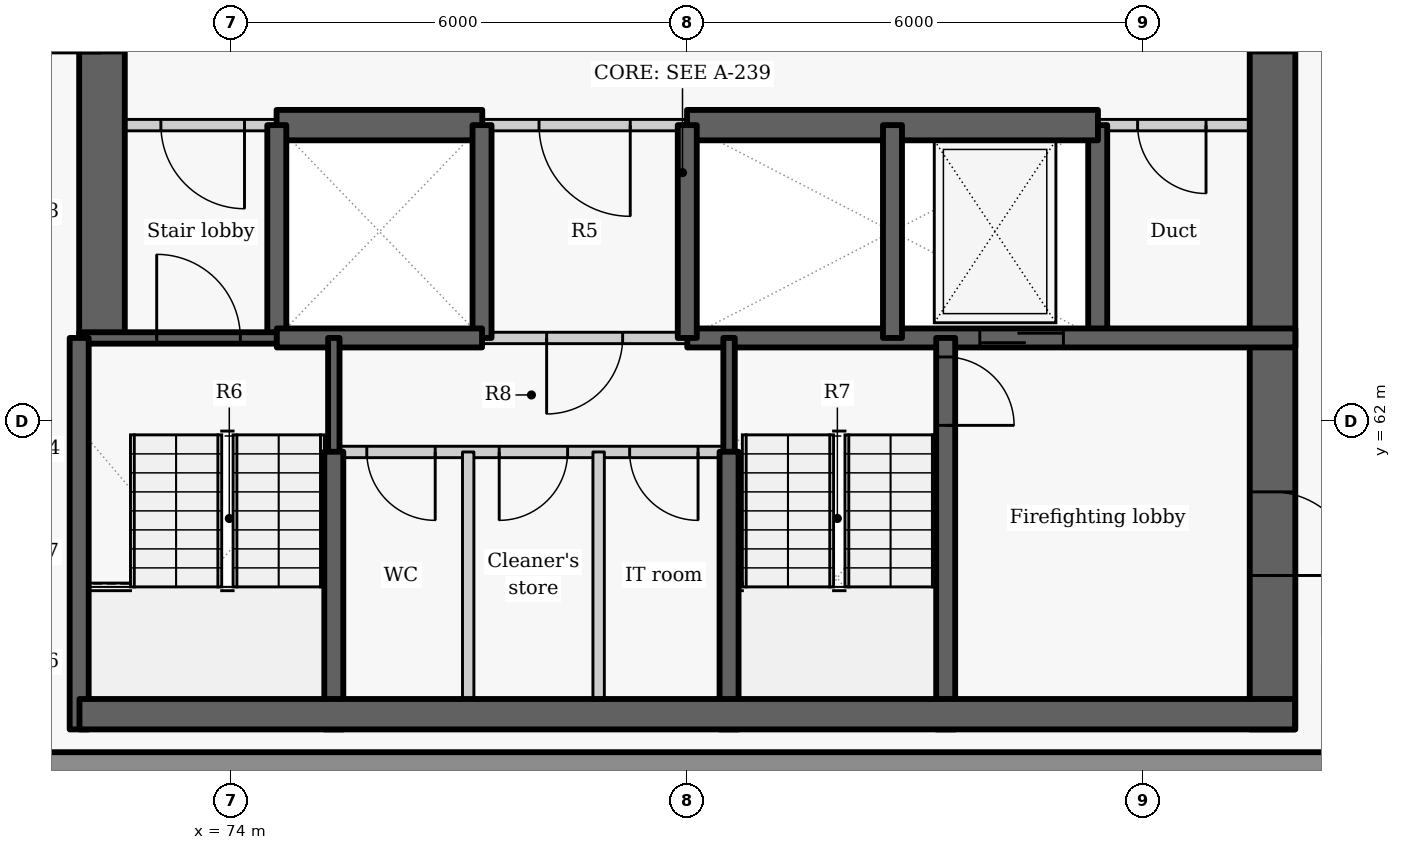
"""IFC4 building model, lengths in metres.
Left out: names, types, materials, properties, quantities, classifications, styles, units other than length and angle.
Written with IfcOpenShell. Run it as: python <this file> out.ifc"""

import sys

from ifc_helpers import new_model, si_unit, direction, frame, frame_2d, origin, place, context, subcontext, project, spatial, rectangle, extrude, element, fill, save


model = new_model("IFC4")
c1 = context("Model", 3, precision=1e-05, world=origin(), true_north=direction((0.0, 1.0)))
c2 = subcontext(c1, "Body", "Model", "MODEL_VIEW")
j1 = project(units=[si_unit("LENGTHUNIT", "METRE"), si_unit("PLANEANGLEUNIT", "RADIAN")], contexts=[c1])
p1 = place(None, origin())
s1 = spatial("IfcSite", under=j1, at=p1, CompositionType="ELEMENT")
p2 = place(p1, origin())
s2 = spatial("IfcBuilding", under=s1, at=p2, CompositionType="ELEMENT")
p3 = place(p2, frame((0.0, 0.0, 226.2)))
s3 = spatial("IfcBuildingStorey", under=s2, at=p3, CompositionType="ELEMENT", Elevation=226.2)
p4 = place(p3, frame((70.501, 57.5, 0.0), z_axis=(0.0, 0.0, 1.0), x_axis=(1.0, 0.0, 0.0)))
e1 = element("IfcWall", 1, at=p4, inside=s3, PredefinedType="SOLIDWALL", context=c2, shape_type="SweptSolid", body=[
    extrude(rectangle(XDim=18.993, YDim=0.3, at=frame_2d((9.496, 0.0))), origin(), (0.0, 0.0, 1.0), 2.425),
])
p5 = place(p3, frame((72.3, 63.1, -0.41), z_axis=(0.0, 0.0, 1.0), x_axis=(0.0, 1.0, 0.0)))
e2 = element("IfcWall", 2, at=p5, inside=s3, PredefinedType="SHEAR", context=c2, shape_type="SweptSolid", body=[
    extrude(rectangle(XDim=9.1, YDim=0.6, at=frame_2d((4.55, 0.0))), origin(), (0.0, 0.0, 1.0), 3.435),
])
p6 = place(p5, frame((3.75, 0.0, 0.41)))
e3 = element("IfcOpeningElement", 3, at=p6, cuts=e2, PredefinedType="OPENING", context=c2, shape_type="SweptSolid", body=[
    extrude(rectangle(XDim=1.5, YDim=2.1, at=frame_2d((0.75, 1.05))), frame((0.0, 0.31, 0.0), z_axis=(0.0, -1.0, 0.0), x_axis=(1.0, 0.0, 0.0)), (0.0, 0.0, 1.0), 0.62),
])
p7 = place(p3, frame((85.4, 63.1, -0.41), z_axis=(0.0, 0.0, 1.0), x_axis=(0.0, 1.0, 0.0)))
e4 = element("IfcWall", 4, at=p7, inside=s3, PredefinedType="SHEAR", context=c2, shape_type="SweptSolid", body=[
    extrude(rectangle(XDim=2.8, YDim=0.25, at=frame_2d((1.4, 0.0))), origin(), (0.0, 0.0, 1.0), 3.435),
])
p8 = place(p3, frame((87.7, 72.2, -0.41), z_axis=(0.0, 0.0, 1.0), x_axis=(0.0, -1.0, 0.0)))
e5 = element("IfcWall", 5, at=p8, inside=s3, PredefinedType="SHEAR", context=c2, shape_type="SweptSolid", body=[
    extrude(rectangle(XDim=14.25, YDim=0.6, at=frame_2d((7.125, 0.0))), origin(), (0.0, 0.0, 1.0), 3.435),
])
p9 = place(p8, frame((3.85, 0.0, 0.41)))
e6 = element("IfcOpeningElement", 6, at=p9, cuts=e5, PredefinedType="OPENING", context=c2, shape_type="SweptSolid", body=[
    extrude(rectangle(XDim=1.5, YDim=2.1, at=frame_2d((0.75, 1.05))), frame((0.0, 0.31, 0.0), z_axis=(0.0, -1.0, 0.0), x_axis=(1.0, 0.0, 0.0)), (0.0, 0.0, 1.0), 0.62),
])
p10 = place(p8, frame((11.125, 0.0, 0.41)))
e7 = element("IfcOpeningElement", 7, at=p10, cuts=e5, PredefinedType="OPENING", context=c2, shape_type="SweptSolid", body=[
    extrude(rectangle(XDim=1.1, YDim=2.1, at=frame_2d((0.55, 1.05))), frame((0.0, 0.31, 0.0), z_axis=(0.0, -1.0, 0.0), x_axis=(1.0, 0.0, 0.0)), (0.0, 0.0, 1.0), 0.62),
])
p11 = place(p3, frame((74.603, 65.9, 0.0), z_axis=(0.0, 0.0, 1.0), x_axis=(-1.0, 0.0, 0.0)))
e8 = element("IfcWall", 8, at=p11, inside=s3, PredefinedType="PARTITIONING", context=c2, shape_type="SweptSolid", body=[
    extrude(rectangle(XDim=2.603, YDim=0.15, at=frame_2d((1.302, 0.0))), origin(), (0.0, 0.0, 1.0), 3.025),
])
p12 = place(p11, frame((0.428, 0.0, 0.0)))
e9 = element("IfcOpeningElement", 9, at=p12, cuts=e8, PredefinedType="OPENING", context=c2, shape_type="SweptSolid", body=[
    extrude(rectangle(XDim=1.1, YDim=2.1, at=frame_2d((0.55, 1.05))), frame((0.0, 0.085, 0.0), z_axis=(0.0, -1.0, 0.0), x_axis=(1.0, 0.0, 0.0)), (0.0, 0.0, 1.0), 0.17),
])
p13 = place(p3, frame((80.003, 65.9, 0.0), z_axis=(0.0, 0.0, 1.0), x_axis=(-1.0, 0.0, 0.0)))
e10 = element("IfcWall", 10, at=p13, inside=s3, PredefinedType="PARTITIONING", context=c2, shape_type="SweptSolid", body=[
    extrude(rectangle(XDim=2.706, YDim=0.15, at=frame_2d((1.353, 0.0))), origin(), (0.0, 0.0, 1.0), 3.025),
])
p14 = place(p13, frame((0.753, 0.0, 0.0)))
e11 = element("IfcOpeningElement", 11, at=p14, cuts=e10, PredefinedType="OPENING", context=c2, shape_type="SweptSolid", body=[
    extrude(rectangle(XDim=1.2, YDim=2.1, at=frame_2d((0.6, 1.05))), frame((0.0, 0.085, 0.0), z_axis=(0.0, -1.0, 0.0), x_axis=(1.0, 0.0, 0.0)), (0.0, 0.0, 1.0), 0.17),
])
p15 = place(p3, frame((88.0, 65.9, 0.0), z_axis=(0.0, 0.0, 1.0), x_axis=(-1.0, 0.0, 0.0)))
e12 = element("IfcWall", 12, at=p15, inside=s3, PredefinedType="PARTITIONING", context=c2, shape_type="SweptSolid", body=[
    extrude(rectangle(XDim=2.603, YDim=0.15, at=frame_2d((1.302, 0.0))), origin(), (0.0, 0.0, 1.0), 3.025),
])
p16 = place(p15, frame((1.175, 0.0, 0.0)))
e13 = element("IfcOpeningElement", 13, at=p16, cuts=e12, PredefinedType="OPENING", context=c2, shape_type="SweptSolid", body=[
    extrude(rectangle(XDim=0.9, YDim=2.1, at=frame_2d((0.45, 1.05))), frame((0.0, 0.085, 0.0), z_axis=(0.0, -1.0, 0.0), x_axis=(1.0, 0.0, 0.0)), (0.0, 0.0, 1.0), 0.17),
])
p17 = place(p3, frame((74.597, 65.9, -0.41), z_axis=(0.0, 0.0, 1.0), x_axis=(1.0, 0.0, 0.0)))
e14 = element("IfcWall", 14, at=p17, inside=s3, PredefinedType="SHEAR", context=c2, shape_type="SweptSolid", body=[
    extrude(rectangle(XDim=2.706, YDim=0.4, at=frame_2d((1.353, 0.0))), origin(), (0.0, 0.0, 1.0), 3.435),
])
p18 = place(p3, frame((79.997, 65.9, -0.41), z_axis=(0.0, 0.0, 1.0), x_axis=(1.0, 0.0, 0.0)))
e15 = element("IfcWall", 15, at=p18, inside=s3, PredefinedType="SHEAR", context=c2, shape_type="SweptSolid", body=[
    extrude(rectangle(XDim=5.406, YDim=0.4, at=frame_2d((2.703, 0.0))), origin(), (0.0, 0.0, 1.0), 3.435),
])
p19 = place(p3, frame((74.6, 63.1, -0.41), z_axis=(0.0, 0.0, 1.0), x_axis=(0.0, 1.0, 0.0)))
e16 = element("IfcWall", 16, at=p19, inside=s3, PredefinedType="SHEAR", context=c2, shape_type="SweptSolid", body=[
    extrude(rectangle(XDim=2.8, YDim=0.25, at=frame_2d((1.4, 0.0))), origin(), (0.0, 0.0, 1.0), 3.435),
])
p20 = place(p3, frame((72.0, 63.1, -0.41), z_axis=(0.0, 0.0, 1.0), x_axis=(1.0, 0.0, 0.0)))
e17 = element("IfcWall", 17, at=p20, inside=s3, PredefinedType="SHEAR", context=c2, shape_type="SweptSolid", body=[
    extrude(rectangle(XDim=2.6, YDim=0.15, at=frame_2d((1.3, 0.0))), origin(), (0.0, 0.0, 1.0), 3.435),
])
p21 = place(p20, frame((1.02, 0.0, 0.41)))
e18 = element("IfcOpeningElement", 18, at=p21, cuts=e17, PredefinedType="OPENING", context=c2, shape_type="SweptSolid", body=[
    extrude(rectangle(XDim=1.1, YDim=2.1, at=frame_2d((0.55, 1.05))), frame((0.0, 0.085, 0.0), z_axis=(0.0, -1.0, 0.0), x_axis=(1.0, 0.0, 0.0)), (0.0, 0.0, 1.0), 0.17),
])
p22 = place(p3, frame((77.3, 63.1, -0.41), z_axis=(0.0, 0.0, 1.0), x_axis=(0.0, 1.0, 0.0)))
e19 = element("IfcWall", 19, at=p22, inside=s3, PredefinedType="SHEAR", context=c2, shape_type="SweptSolid", body=[
    extrude(rectangle(XDim=2.8, YDim=0.25, at=frame_2d((1.4, 0.0))), origin(), (0.0, 0.0, 1.0), 3.435),
])
p23 = place(p3, frame((74.6, 63.1, -0.41), z_axis=(0.0, 0.0, 1.0), x_axis=(1.0, 0.0, 0.0)))
e20 = element("IfcWall", 20, at=p23, inside=s3, PredefinedType="SHEAR", context=c2, shape_type="SweptSolid", body=[
    extrude(rectangle(XDim=2.7, YDim=0.25, at=frame_2d((1.35, 0.0))), origin(), (0.0, 0.0, 1.0), 3.435),
])
p24 = place(p3, frame((80.0, 63.1, -0.41), z_axis=(0.0, 0.0, 1.0), x_axis=(1.0, 0.0, 0.0)))
e21 = element("IfcWall", 21, at=p24, inside=s3, PredefinedType="SHEAR", context=c2, shape_type="SweptSolid", body=[
    extrude(rectangle(XDim=8.0, YDim=0.25, at=frame_2d((4.0, 0.0))), origin(), (0.0, 0.0, 1.0), 3.435),
])
p25 = place(p24, frame((3.849, 0.0, 0.41)))
e22 = element("IfcOpeningElement", 22, at=p25, cuts=e21, PredefinedType="OPENING", context=c2, shape_type="SweptSolid", body=[
    extrude(rectangle(XDim=1.1, YDim=2.1, at=frame_2d((0.55, 1.05))), frame((0.0, 0.135, 0.0), z_axis=(0.0, -1.0, 0.0), x_axis=(1.0, 0.0, 0.0)), (0.0, 0.0, 1.0), 0.27),
])
p26 = place(p3, frame((80.0, 63.1, -0.41), z_axis=(0.0, 0.0, 1.0), x_axis=(0.0, 1.0, 0.0)))
e23 = element("IfcWall", 23, at=p26, inside=s3, PredefinedType="SHEAR", context=c2, shape_type="SweptSolid", body=[
    extrude(rectangle(XDim=2.8, YDim=0.25, at=frame_2d((1.4, 0.0))), origin(), (0.0, 0.0, 1.0), 3.435),
])
p27 = place(p3, frame((80.0, 63.1, 0.0), z_axis=(0.0, 0.0, 1.0), x_axis=(-1.0, 0.0, 0.0)))
e24 = element("IfcWall", 24, at=p27, inside=s3, PredefinedType="PARTITIONING", context=c2, shape_type="SweptSolid", body=[
    extrude(rectangle(XDim=2.7, YDim=0.15, at=frame_2d((1.35, 0.0))), origin(), (0.0, 0.0, 1.0), 3.025),
])
p28 = place(p27, frame((0.85, 0.0, 0.0)))
e25 = element("IfcOpeningElement", 25, at=p28, cuts=e24, PredefinedType="OPENING", context=c2, shape_type="SweptSolid", body=[
    extrude(rectangle(XDim=1.0, YDim=2.1, at=frame_2d((0.5, 1.05))), frame((0.0, 0.085, 0.0), z_axis=(0.0, -1.0, 0.0), x_axis=(1.0, 0.0, 0.0)), (0.0, 0.0, 1.0), 0.17),
])
p29 = place(p3, frame((82.7, 63.1, -0.41), z_axis=(0.0, 0.0, 1.0), x_axis=(0.0, 1.0, 0.0)))
e26 = element("IfcWall", 26, at=p29, inside=s3, PredefinedType="SHEAR", context=c2, shape_type="SweptSolid", body=[
    extrude(rectangle(XDim=2.8, YDim=0.25, at=frame_2d((1.4, 0.0))), origin(), (0.0, 0.0, 1.0), 3.435),
])
p30 = place(p3, frame((75.35, 61.597, -0.41), z_axis=(0.0, 0.0, 1.0), x_axis=(0.0, 1.0, 0.0)))
e27 = element("IfcWall", 27, at=p30, inside=s3, PredefinedType="SHEAR", context=c2, shape_type="SweptSolid", body=[
    extrude(rectangle(XDim=1.503, YDim=0.15, at=frame_2d((0.751, 0.0))), origin(), (0.0, 0.0, 1.0), 3.435),
])
p31 = place(p3, frame((75.35, 57.95, -0.41), z_axis=(0.0, 0.0, 1.0), x_axis=(0.0, 1.0, 0.0)))
e28 = element("IfcWall", 28, at=p31, inside=s3, PredefinedType="SHEAR", context=c2, shape_type="SweptSolid", body=[
    extrude(rectangle(XDim=3.653, YDim=0.25, at=frame_2d((1.827, 0.0))), origin(), (0.0, 0.0, 1.0), 3.435),
])
p32 = place(p3, frame((72.0, 57.95, -0.41), z_axis=(0.0, 0.0, 1.0), x_axis=(0.0, 1.0, 0.0)))
e29 = element("IfcWall", 29, at=p32, inside=s3, PredefinedType="SHEAR", context=c2, shape_type="SweptSolid", body=[
    extrude(rectangle(XDim=5.15, YDim=0.25, at=frame_2d((2.575, 0.0))), origin(), (0.0, 0.0, 1.0), 3.435),
])
p33 = place(p3, frame((83.4, 63.1, -0.41), z_axis=(0.0, 0.0, 1.0), x_axis=(0.0, -1.0, 0.0)))
e30 = element("IfcWall", 30, at=p33, inside=s3, PredefinedType="SHEAR", context=c2, shape_type="SweptSolid", body=[
    extrude(rectangle(XDim=5.15, YDim=0.25, at=frame_2d((2.575, 0.0))), origin(), (0.0, 0.0, 1.0), 3.435),
])
p34 = place(p33, frame((0.25, 0.0, 0.41)))
e31 = element("IfcOpeningElement", 31, at=p34, cuts=e30, PredefinedType="OPENING", context=c2, shape_type="SweptSolid", body=[
    extrude(rectangle(XDim=0.9, YDim=2.1, at=frame_2d((0.45, 1.05))), frame((0.0, 0.135, 0.0), z_axis=(0.0, -1.0, 0.0), x_axis=(1.0, 0.0, 0.0)), (0.0, 0.0, 1.0), 0.27),
])
p35 = place(p3, frame((80.55, 61.597, -0.41), z_axis=(0.0, 0.0, 1.0), x_axis=(0.0, 1.0, 0.0)))
e32 = element("IfcWall", 32, at=p35, inside=s3, PredefinedType="SHEAR", context=c2, shape_type="SweptSolid", body=[
    extrude(rectangle(XDim=1.503, YDim=0.15, at=frame_2d((0.751, 0.0))), origin(), (0.0, 0.0, 1.0), 3.435),
])
p36 = place(p3, frame((80.55, 57.95, -0.41), z_axis=(0.0, 0.0, 1.0), x_axis=(0.0, 1.0, 0.0)))
e33 = element("IfcWall", 33, at=p36, inside=s3, PredefinedType="SHEAR", context=c2, shape_type="SweptSolid", body=[
    extrude(rectangle(XDim=3.653, YDim=0.25, at=frame_2d((1.827, 0.0))), origin(), (0.0, 0.0, 1.0), 3.435),
])
p37 = place(p3, frame((80.55, 61.6, 0.0), z_axis=(0.0, 0.0, 1.0), x_axis=(-1.0, 0.0, 0.0)))
e34 = element("IfcWall", 34, at=p37, inside=s3, PredefinedType="PARTITIONING", context=c2, shape_type="SweptSolid", body=[
    extrude(rectangle(XDim=5.2, YDim=0.15, at=frame_2d((2.6, 0.0))), origin(), (0.0, 0.0, 1.0), 3.025),
])
p38 = place(p37, frame((3.866, 0.0, 0.0)))
e35 = element("IfcOpeningElement", 35, at=p38, cuts=e34, PredefinedType="OPENING", context=c2, shape_type="SweptSolid", body=[
    extrude(rectangle(XDim=0.9, YDim=2.1, at=frame_2d((0.45, 1.05))), frame((0.0, 0.085, 0.0), z_axis=(0.0, -1.0, 0.0), x_axis=(1.0, 0.0, 0.0)), (0.0, 0.0, 1.0), 0.17),
])
p39 = place(p37, frame((2.124, 0.0, 0.0)))
e36 = element("IfcOpeningElement", 36, at=p39, cuts=e34, PredefinedType="OPENING", context=c2, shape_type="SweptSolid", body=[
    extrude(rectangle(XDim=0.9, YDim=2.1, at=frame_2d((0.45, 1.05))), frame((0.0, 0.085, 0.0), z_axis=(0.0, -1.0, 0.0), x_axis=(1.0, 0.0, 0.0)), (0.0, 0.0, 1.0), 0.17),
])
p40 = place(p37, frame((0.408, 0.0, 0.0)))
e37 = element("IfcOpeningElement", 37, at=p40, cuts=e34, PredefinedType="OPENING", context=c2, shape_type="SweptSolid", body=[
    extrude(rectangle(XDim=0.9, YDim=2.1, at=frame_2d((0.45, 1.05))), frame((0.0, 0.085, 0.0), z_axis=(0.0, -1.0, 0.0), x_axis=(1.0, 0.0, 0.0)), (0.0, 0.0, 1.0), 0.17),
])
for number, where, z_axis, x_axis in (
    (38, (77.118, 57.95, 0.0), (0.0, 0.0, 1.0), (0.0, 1.0, 0.0)),
    (39, (78.834, 57.95, 0.0), (0.0, 0.0, 1.0), (0.0, 1.0, 0.0)),
):
    element("IfcWall", number, at=place(p3, frame(where, z_axis=z_axis, x_axis=x_axis)), inside=s3, PredefinedType="PARTITIONING", context=c2, shape_type="SweptSolid", body=[
        extrude(rectangle(XDim=3.65, YDim=0.15, at=frame_2d((1.825, 0.0))), origin(), (0.0, 0.0, 1.0), 3.025),
    ])
p41 = place(p3, frame((72.004, 58.15, -0.41), z_axis=(0.0, 0.0, 1.0), x_axis=(1.0, 0.0, 0.0)))
e40 = element("IfcWall", 40, at=p41, inside=s3, PredefinedType="SHEAR", context=c2, shape_type="SweptSolid", body=[
    extrude(rectangle(XDim=15.992, YDim=0.4, at=frame_2d((7.996, 0.0))), origin(), (0.0, 0.0, 1.0), 3.435),
])
p42 = place(p12, origin())
e41 = element("IfcDoor", 41, at=p42, inside=s3, OperationType="SINGLE_SWING_LEFT", PredefinedType="DOOR", context=c2, shape_type="SweptSolid", body=[
    extrude(rectangle(XDim=1.1, YDim=2.1, at=frame_2d((0.55, 1.05))), frame((0.0, 0.025, 0.0), z_axis=(0.0, -1.0, 0.0), x_axis=(1.0, 0.0, 0.0)), (0.0, 0.0, 1.0), 0.05),
])
fill(e9, e41)
p43 = place(p14, origin())
e42 = element("IfcDoor", 42, at=p43, inside=s3, OperationType="DOUBLE_DOOR_SINGLE_SWING", PredefinedType="DOOR", context=c2, shape_type="SweptSolid", body=[
    extrude(rectangle(XDim=1.2, YDim=2.1, at=frame_2d((0.6, 1.05))), frame((0.0, 0.025, 0.0), z_axis=(0.0, -1.0, 0.0), x_axis=(1.0, 0.0, 0.0)), (0.0, 0.0, 1.0), 0.05),
])
fill(e11, e42)
p44 = place(p25, origin())
e43 = element("IfcDoor", 43, at=p44, inside=s3, OperationType="SLIDING_TO_LEFT", PredefinedType="DOOR", context=c2, shape_type="SweptSolid", body=[
    extrude(rectangle(XDim=1.1, YDim=2.1, at=frame_2d((0.55, 1.05))), frame((0.0, 0.025, 0.0), z_axis=(0.0, -1.0, 0.0), x_axis=(1.0, 0.0, 0.0)), (0.0, 0.0, 1.0), 0.05),
])
fill(e22, e43)
p45 = place(p16, origin())
e44 = element("IfcDoor", 44, at=p45, inside=s3, OperationType="SINGLE_SWING_LEFT", PredefinedType="DOOR", context=c2, shape_type="SweptSolid", body=[
    extrude(rectangle(XDim=0.9, YDim=2.1, at=frame_2d((0.45, 1.05))), frame((0.0, 0.025, 0.0), z_axis=(0.0, -1.0, 0.0), x_axis=(1.0, 0.0, 0.0)), (0.0, 0.0, 1.0), 0.05),
])
fill(e13, e44)
p46 = place(p28, origin())
e45 = element("IfcDoor", 45, at=p46, inside=s3, OperationType="SINGLE_SWING_RIGHT", PredefinedType="DOOR", context=c2, shape_type="SweptSolid", body=[
    extrude(rectangle(XDim=1.0, YDim=2.1, at=frame_2d((0.5, 1.05))), frame((0.0, 0.025, 0.0), z_axis=(0.0, -1.0, 0.0), x_axis=(1.0, 0.0, 0.0)), (0.0, 0.0, 1.0), 0.05),
])
fill(e25, e45)
p47 = place(p38, origin())
e46 = element("IfcDoor", 46, at=p47, inside=s3, OperationType="SINGLE_SWING_LEFT", PredefinedType="DOOR", context=c2, shape_type="SweptSolid", body=[
    extrude(rectangle(XDim=0.9, YDim=2.1, at=frame_2d((0.45, 1.05))), frame((0.0, 0.025, 0.0), z_axis=(0.0, -1.0, 0.0), x_axis=(1.0, 0.0, 0.0)), (0.0, 0.0, 1.0), 0.05),
])
fill(e35, e46)
p48 = place(p39, origin())
e47 = element("IfcDoor", 47, at=p48, inside=s3, OperationType="SINGLE_SWING_RIGHT", PredefinedType="DOOR", context=c2, shape_type="SweptSolid", body=[
    extrude(rectangle(XDim=0.9, YDim=2.1, at=frame_2d((0.45, 1.05))), frame((0.0, 0.025, 0.0), z_axis=(0.0, -1.0, 0.0), x_axis=(1.0, 0.0, 0.0)), (0.0, 0.0, 1.0), 0.05),
])
fill(e36, e47)
p49 = place(p40, origin())
e48 = element("IfcDoor", 48, at=p49, inside=s3, OperationType="SINGLE_SWING_LEFT", PredefinedType="DOOR", context=c2, shape_type="SweptSolid", body=[
    extrude(rectangle(XDim=0.9, YDim=2.1, at=frame_2d((0.45, 1.05))), frame((0.0, 0.025, 0.0), z_axis=(0.0, -1.0, 0.0), x_axis=(1.0, 0.0, 0.0)), (0.0, 0.0, 1.0), 0.05),
])
fill(e37, e48)
p50 = place(p21, origin())
e49 = element("IfcDoor", 49, at=p50, inside=s3, OperationType="SINGLE_SWING_LEFT", PredefinedType="DOOR", context=c2, shape_type="SweptSolid", body=[
    extrude(rectangle(XDim=1.1, YDim=2.1, at=frame_2d((0.55, 1.05))), frame((0.0, 0.025, 0.0), z_axis=(0.0, -1.0, 0.0), x_axis=(1.0, 0.0, 0.0)), (0.0, 0.0, 1.0), 0.05),
])
fill(e18, e49)
p51 = place(p34, origin())
e50 = element("IfcDoor", 50, at=p51, inside=s3, OperationType="SINGLE_SWING_RIGHT", PredefinedType="DOOR", context=c2, shape_type="SweptSolid", body=[
    extrude(rectangle(XDim=0.9, YDim=2.1, at=frame_2d((0.45, 1.05))), frame((0.0, 0.025, 0.0), z_axis=(0.0, -1.0, 0.0), x_axis=(1.0, 0.0, 0.0)), (0.0, 0.0, 1.0), 0.05),
])
fill(e31, e50)
p52 = place(p9, origin())
e51 = element("IfcDoor", 51, at=p52, inside=s3, OperationType="DOUBLE_DOOR_SINGLE_SWING", PredefinedType="DOOR", context=c2, shape_type="SweptSolid", body=[
    extrude(rectangle(XDim=1.5, YDim=2.1, at=frame_2d((0.75, 1.05))), frame((0.0, 0.025, 0.0), z_axis=(0.0, -1.0, 0.0), x_axis=(1.0, 0.0, 0.0)), (0.0, 0.0, 1.0), 0.05),
])
fill(e6, e51)
p53 = place(p10, origin())
e52 = element("IfcDoor", 52, at=p53, inside=s3, OperationType="SINGLE_SWING_RIGHT", PredefinedType="DOOR", context=c2, shape_type="SweptSolid", body=[
    extrude(rectangle(XDim=1.1, YDim=2.1, at=frame_2d((0.55, 1.05))), frame((0.0, 0.025, 0.0), z_axis=(0.0, -1.0, 0.0), x_axis=(1.0, 0.0, 0.0)), (0.0, 0.0, 1.0), 0.05),
])
fill(e7, e52)
save(model, sys.argv[1])
